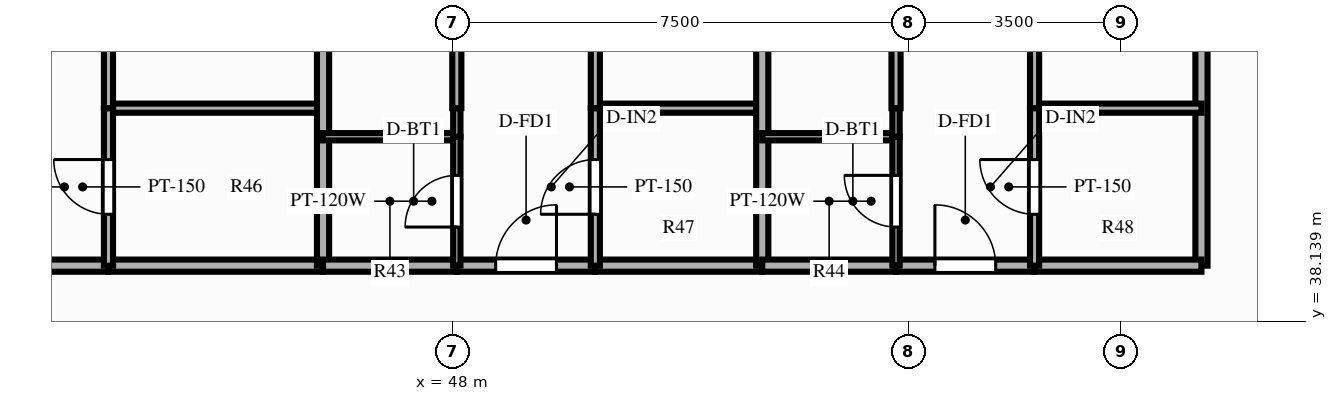
"""IFC4 building model, lengths in metres.
Left out: names, types, materials, properties, quantities, classifications, styles, units other than length and angle.
Written with IfcOpenShell. Run it as: python <this file> out.ifc"""

import sys

from ifc_helpers import new_model, si_unit, direction, frame, frame_2d, origin, place, context, subcontext, project, spatial, rectangle, extrude, source, transform, mapped, element, fill, save


model = new_model("IFC4")
c1 = context("Model", 3, precision=1e-05, world=origin(), true_north=direction((0.0, 1.0)))
c2 = subcontext(c1, "Body", "Model", "MODEL_VIEW")
j1 = project(units=[si_unit("LENGTHUNIT", "METRE"), si_unit("PLANEANGLEUNIT", "RADIAN")], contexts=[c1])
p1 = place(None, origin())
s1 = spatial("IfcSite", under=j1, at=p1, CompositionType="ELEMENT")
p2 = place(p1, origin())
s2 = spatial("IfcBuilding", under=s1, at=p2, CompositionType="ELEMENT")
p3 = place(p2, frame((0.0, 0.0, 25.4)))
s3 = spatial("IfcBuildingStorey", under=s2, at=p3, CompositionType="ELEMENT", Elevation=25.4)
p4 = place(p3, frame((60.32, 39.05, 0.0), z_axis=(0.0, 0.0, 1.0), x_axis=(0.0, 1.0, 0.0)))
e1 = element("IfcWall", 1, at=p4, inside=s3, PredefinedType="PARTITIONING", context=c2, shape_type="SweptSolid", body=[
    extrude(rectangle(XDim=11.8, YDim=0.2, at=frame_2d((5.9, 0.0))), origin(), (0.0, 0.0, 1.0), 2.79),
])
p5 = place(p3, frame((34.602, 39.05, 0.0), z_axis=(0.0, 0.0, 1.0), x_axis=(1.0, 0.0, 0.0)))
e2 = element("IfcWall", 2, at=p5, inside=s3, PredefinedType="PARTITIONING", context=c2, shape_type="SweptSolid", body=[
    extrude(rectangle(XDim=7.743, YDim=0.2, at=frame_2d((3.871, 0.0))), origin(), (0.0, 0.0, 1.0), 2.79),
])
p6 = place(p5, frame((3.371, 0.0, 0.0)))
e3 = element("IfcOpeningElement", 3, at=p6, cuts=e2, PredefinedType="OPENING", context=c2, shape_type="SweptSolid", body=[
    extrude(rectangle(XDim=1.0, YDim=2.15, at=frame_2d((0.5, 1.075))), frame((0.0, 0.112, 0.0), z_axis=(0.0, -1.0, 0.0), x_axis=(1.0, 0.0, 0.0)), (0.0, 0.0, 1.0), 0.224),
])
p7 = place(p3, frame((42.344, 39.05, 0.0), z_axis=(0.0, 0.0, 1.0), x_axis=(1.0, 0.0, 0.0)))
e4 = element("IfcWall", 4, at=p7, inside=s3, PredefinedType="PARTITIONING", context=c2, shape_type="SweptSolid", body=[
    extrude(rectangle(XDim=3.529, YDim=0.2, at=frame_2d((1.764, 0.0))), origin(), (0.0, 0.0, 1.0), 2.79),
])
p8 = place(p3, frame((42.344, 41.64, 0.0), z_axis=(0.0, 0.0, 1.0), x_axis=(1.0, 0.0, 0.0)))
e5 = element("IfcWall", 5, at=p8, inside=s3, PredefinedType="PARTITIONING", context=c2, shape_type="SweptSolid", body=[
    extrude(rectangle(XDim=3.529, YDim=0.15, at=frame_2d((1.764, 0.0))), origin(), (0.0, 0.0, 1.0), 2.79),
])
p9 = place(p3, frame((42.344, 39.05, 0.0), z_axis=(0.0, 0.0, 1.0), x_axis=(0.0, 1.0, 0.0)))
e6 = element("IfcWall", 6, at=p9, inside=s3, PredefinedType="PARTITIONING", context=c2, shape_type="SweptSolid", body=[
    extrude(rectangle(XDim=2.59, YDim=0.15, at=frame_2d((1.295, 0.0))), origin(), (0.0, 0.0, 1.0), 2.79),
])
p10 = place(p9, frame((0.845, 0.0, 0.0)))
e7 = element("IfcOpeningElement", 7, at=p10, cuts=e6, PredefinedType="OPENING", context=c2, shape_type="SweptSolid", body=[
    extrude(rectangle(XDim=0.9, YDim=2.1, at=frame_2d((0.45, 1.05))), frame((0.0, 0.087, 0.0), z_axis=(0.0, -1.0, 0.0), x_axis=(1.0, 0.0, 0.0)), (0.0, 0.0, 1.0), 0.174),
])
p11 = place(p3, frame((42.344, 41.64, 0.0), z_axis=(0.0, 0.0, 1.0), x_axis=(0.0, 1.0, 0.0)))
e8 = element("IfcWall", 8, at=p11, inside=s3, PredefinedType="PARTITIONING", context=c2, shape_type="SweptSolid", body=[
    extrude(rectangle(XDim=9.21, YDim=0.15, at=frame_2d((4.605, 0.0))), origin(), (0.0, 0.0, 1.0), 2.79),
])
p12 = place(p11, frame((3.829, 0.0, 0.0)))
e9 = element("IfcOpeningElement", 9, at=p12, cuts=e8, PredefinedType="OPENING", context=c2, shape_type="SweptSolid", body=[
    extrude(rectangle(XDim=0.9, YDim=2.1, at=frame_2d((0.45, 1.05))), frame((0.0, 0.087, 0.0), z_axis=(0.0, -1.0, 0.0), x_axis=(1.0, 0.0, 0.0)), (0.0, 0.0, 1.0), 0.174),
])
p13 = place(p3, frame((45.873, 39.05, 0.0), z_axis=(0.0, 0.0, 1.0), x_axis=(0.0, 1.0, 0.0)))
e10 = element("IfcWall", 10, at=p13, inside=s3, PredefinedType="PARTITIONING", context=c2, shape_type="SweptSolid", body=[
    extrude(rectangle(XDim=11.8, YDim=0.2, at=frame_2d((5.9, 0.0))), origin(), (0.0, 0.0, 1.0), 2.79),
])
p14 = place(p3, frame((45.873, 39.05, 0.0), z_axis=(0.0, 0.0, 1.0), x_axis=(1.0, 0.0, 0.0)))
e11 = element("IfcWall", 11, at=p14, inside=s3, PredefinedType="PARTITIONING", context=c2, shape_type="SweptSolid", body=[
    extrude(rectangle(XDim=2.2, YDim=0.2, at=frame_2d((1.1, 0.0))), origin(), (0.0, 0.0, 1.0), 2.79),
])
p15 = place(p3, frame((48.073, 39.05, 0.0), z_axis=(0.0, 0.0, 1.0), x_axis=(1.0, 0.0, 0.0)))
e12 = element("IfcWall", 12, at=p15, inside=s3, PredefinedType="PARTITIONING", context=c2, shape_type="SweptSolid", body=[
    extrude(rectangle(XDim=2.278, YDim=0.2, at=frame_2d((1.139, 0.0))), origin(), (0.0, 0.0, 1.0), 2.79),
])
p16 = place(p15, frame((0.639, 0.0, 0.0)))
e13 = element("IfcOpeningElement", 13, at=p16, cuts=e12, PredefinedType="OPENING", context=c2, shape_type="SweptSolid", body=[
    extrude(rectangle(XDim=1.0, YDim=2.15, at=frame_2d((0.5, 1.075))), frame((0.0, 0.112, 0.0), z_axis=(0.0, -1.0, 0.0), x_axis=(1.0, 0.0, 0.0)), (0.0, 0.0, 1.0), 0.224),
])
p17 = place(p3, frame((50.352, 39.05, 0.0), z_axis=(0.0, 0.0, 1.0), x_axis=(1.0, 0.0, 0.0)))
e14 = element("IfcWall", 14, at=p17, inside=s3, PredefinedType="PARTITIONING", context=c2, shape_type="SweptSolid", body=[
    extrude(rectangle(XDim=2.745, YDim=0.2, at=frame_2d((1.373, 0.0))), origin(), (0.0, 0.0, 1.0), 2.79),
])
p18 = place(p3, frame((45.873, 41.17, 0.0), z_axis=(0.0, 0.0, 1.0), x_axis=(1.0, 0.0, 0.0)))
e15 = element("IfcWall", 15, at=p18, inside=s3, PredefinedType="PARTITIONING", context=c2, shape_type="SweptSolid", body=[
    extrude(rectangle(XDim=2.2, YDim=0.12, at=frame_2d((1.1, 0.0))), origin(), (0.0, 0.0, 1.0), 2.79),
])
p19 = place(p3, frame((50.352, 41.64, 0.0), z_axis=(0.0, 0.0, 1.0), x_axis=(1.0, 0.0, 0.0)))
e16 = element("IfcWall", 16, at=p19, inside=s3, PredefinedType="PARTITIONING", context=c2, shape_type="SweptSolid", body=[
    extrude(rectangle(XDim=2.745, YDim=0.15, at=frame_2d((1.373, 0.0))), origin(), (0.0, 0.0, 1.0), 2.79),
])
p20 = place(p3, frame((48.073, 39.05, 0.0), z_axis=(0.0, 0.0, 1.0), x_axis=(0.0, 1.0, 0.0)))
e17 = element("IfcWall", 17, at=p20, inside=s3, PredefinedType="PARTITIONING", context=c2, shape_type="SweptSolid", body=[
    extrude(rectangle(XDim=2.12, YDim=0.12, at=frame_2d((1.06, 0.0))), origin(), (0.0, 0.0, 1.0), 2.79),
])
p21 = place(p20, frame((0.635, 0.0, 0.0)))
e18 = element("IfcOpeningElement", 18, at=p21, cuts=e17, PredefinedType="OPENING", context=c2, shape_type="SweptSolid", body=[
    extrude(rectangle(XDim=0.85, YDim=2.05, at=frame_2d((0.425, 1.025))), frame((0.0, 0.072, 0.0), z_axis=(0.0, -1.0, 0.0), x_axis=(1.0, 0.0, 0.0)), (0.0, 0.0, 1.0), 0.144),
])
p22 = place(p3, frame((48.073, 41.17, 0.0), z_axis=(0.0, 0.0, 1.0), x_axis=(0.0, 1.0, 0.0)))
e19 = element("IfcWall", 19, at=p22, inside=s3, PredefinedType="PARTITIONING", context=c2, shape_type="SweptSolid", body=[
    extrude(rectangle(XDim=0.47, YDim=0.12, at=frame_2d((0.235, 0.0))), origin(), (0.0, 0.0, 1.0), 2.79),
])
p23 = place(p3, frame((48.073, 41.64, 0.0), z_axis=(0.0, 0.0, 1.0), x_axis=(0.0, 1.0, 0.0)))
e20 = element("IfcWall", 20, at=p23, inside=s3, PredefinedType="PARTITIONING", context=c2, shape_type="SweptSolid", body=[
    extrude(rectangle(XDim=9.21, YDim=0.15, at=frame_2d((4.605, 0.0))), origin(), (0.0, 0.0, 1.0), 2.79),
])
p24 = place(p23, frame((3.829, 0.0, 0.0)))
e21 = element("IfcOpeningElement", 21, at=p24, cuts=e20, PredefinedType="OPENING", context=c2, shape_type="SweptSolid", body=[
    extrude(rectangle(XDim=0.9, YDim=2.1, at=frame_2d((0.45, 1.05))), frame((0.0, 0.087, 0.0), z_axis=(0.0, -1.0, 0.0), x_axis=(1.0, 0.0, 0.0)), (0.0, 0.0, 1.0), 0.174),
])
p25 = place(p3, frame((50.352, 39.05, 0.0), z_axis=(0.0, 0.0, 1.0), x_axis=(0.0, 1.0, 0.0)))
e22 = element("IfcWall", 22, at=p25, inside=s3, PredefinedType="PARTITIONING", context=c2, shape_type="SweptSolid", body=[
    extrude(rectangle(XDim=2.59, YDim=0.15, at=frame_2d((1.295, 0.0))), origin(), (0.0, 0.0, 1.0), 2.79),
])
p26 = place(p25, frame((0.845, 0.0, 0.0)))
e23 = element("IfcOpeningElement", 23, at=p26, cuts=e22, PredefinedType="OPENING", context=c2, shape_type="SweptSolid", body=[
    extrude(rectangle(XDim=0.9, YDim=2.1, at=frame_2d((0.45, 1.05))), frame((0.0, 0.087, 0.0), z_axis=(0.0, -1.0, 0.0), x_axis=(1.0, 0.0, 0.0)), (0.0, 0.0, 1.0), 0.174),
])
p27 = place(p3, frame((50.352, 41.64, 0.0), z_axis=(0.0, 0.0, 1.0), x_axis=(0.0, 1.0, 0.0)))
e24 = element("IfcWall", 24, at=p27, inside=s3, PredefinedType="PARTITIONING", context=c2, shape_type="SweptSolid", body=[
    extrude(rectangle(XDim=9.21, YDim=0.15, at=frame_2d((4.605, 0.0))), origin(), (0.0, 0.0, 1.0), 2.79),
])
p28 = place(p27, frame((3.829, 0.0, 0.0)))
e25 = element("IfcOpeningElement", 25, at=p28, cuts=e24, PredefinedType="OPENING", context=c2, shape_type="SweptSolid", body=[
    extrude(rectangle(XDim=0.9, YDim=2.1, at=frame_2d((0.45, 1.05))), frame((0.0, 0.087, 0.0), z_axis=(0.0, -1.0, 0.0), x_axis=(1.0, 0.0, 0.0)), (0.0, 0.0, 1.0), 0.174),
])
p29 = place(p3, frame((53.097, 39.05, 0.0), z_axis=(0.0, 0.0, 1.0), x_axis=(0.0, 1.0, 0.0)))
e26 = element("IfcWall", 26, at=p29, inside=s3, PredefinedType="PARTITIONING", context=c2, shape_type="SweptSolid", body=[
    extrude(rectangle(XDim=11.8, YDim=0.2, at=frame_2d((5.9, 0.0))), origin(), (0.0, 0.0, 1.0), 2.79),
])
p30 = place(p3, frame((53.097, 39.05, 0.0), z_axis=(0.0, 0.0, 1.0), x_axis=(1.0, 0.0, 0.0)))
e27 = element("IfcWall", 27, at=p30, inside=s3, PredefinedType="PARTITIONING", context=c2, shape_type="SweptSolid", body=[
    extrude(rectangle(XDim=2.2, YDim=0.2, at=frame_2d((1.1, 0.0))), origin(), (0.0, 0.0, 1.0), 2.79),
])
p31 = place(p3, frame((55.297, 39.05, 0.0), z_axis=(0.0, 0.0, 1.0), x_axis=(1.0, 0.0, 0.0)))
e28 = element("IfcWall", 28, at=p31, inside=s3, PredefinedType="PARTITIONING", context=c2, shape_type="SweptSolid", body=[
    extrude(rectangle(XDim=2.279, YDim=0.2, at=frame_2d((1.139, 0.0))), origin(), (0.0, 0.0, 1.0), 2.79),
])
p32 = place(p31, frame((0.639, 0.0, 0.0)))
e29 = element("IfcOpeningElement", 29, at=p32, cuts=e28, PredefinedType="OPENING", context=c2, shape_type="SweptSolid", body=[
    extrude(rectangle(XDim=1.0, YDim=2.15, at=frame_2d((0.5, 1.075))), frame((0.0, 0.112, 0.0), z_axis=(0.0, -1.0, 0.0), x_axis=(1.0, 0.0, 0.0)), (0.0, 0.0, 1.0), 0.224),
])
p33 = place(p3, frame((57.575, 39.05, 0.0), z_axis=(0.0, 0.0, 1.0), x_axis=(1.0, 0.0, 0.0)))
e30 = element("IfcWall", 30, at=p33, inside=s3, PredefinedType="PARTITIONING", context=c2, shape_type="SweptSolid", body=[
    extrude(rectangle(XDim=2.745, YDim=0.2, at=frame_2d((1.373, 0.0))), origin(), (0.0, 0.0, 1.0), 2.79),
])
p34 = place(p3, frame((53.097, 41.17, 0.0), z_axis=(0.0, 0.0, 1.0), x_axis=(1.0, 0.0, 0.0)))
e31 = element("IfcWall", 31, at=p34, inside=s3, PredefinedType="PARTITIONING", context=c2, shape_type="SweptSolid", body=[
    extrude(rectangle(XDim=2.2, YDim=0.12, at=frame_2d((1.1, 0.0))), origin(), (0.0, 0.0, 1.0), 2.79),
])
p35 = place(p3, frame((57.575, 41.64, 0.0), z_axis=(0.0, 0.0, 1.0), x_axis=(1.0, 0.0, 0.0)))
e32 = element("IfcWall", 32, at=p35, inside=s3, PredefinedType="PARTITIONING", context=c2, shape_type="SweptSolid", body=[
    extrude(rectangle(XDim=2.745, YDim=0.15, at=frame_2d((1.373, 0.0))), origin(), (0.0, 0.0, 1.0), 2.79),
])
p36 = place(p3, frame((55.297, 39.05, 0.0), z_axis=(0.0, 0.0, 1.0), x_axis=(0.0, 1.0, 0.0)))
e33 = element("IfcWall", 33, at=p36, inside=s3, PredefinedType="PARTITIONING", context=c2, shape_type="SweptSolid", body=[
    extrude(rectangle(XDim=2.12, YDim=0.12, at=frame_2d((1.06, 0.0))), origin(), (0.0, 0.0, 1.0), 2.79),
])
p37 = place(p36, frame((0.635, 0.0, 0.0)))
e34 = element("IfcOpeningElement", 34, at=p37, cuts=e33, PredefinedType="OPENING", context=c2, shape_type="SweptSolid", body=[
    extrude(rectangle(XDim=0.85, YDim=2.05, at=frame_2d((0.425, 1.025))), frame((0.0, 0.072, 0.0), z_axis=(0.0, -1.0, 0.0), x_axis=(1.0, 0.0, 0.0)), (0.0, 0.0, 1.0), 0.144),
])
p38 = place(p3, frame((55.297, 41.17, 0.0), z_axis=(0.0, 0.0, 1.0), x_axis=(0.0, 1.0, 0.0)))
e35 = element("IfcWall", 35, at=p38, inside=s3, PredefinedType="PARTITIONING", context=c2, shape_type="SweptSolid", body=[
    extrude(rectangle(XDim=0.47, YDim=0.12, at=frame_2d((0.235, 0.0))), origin(), (0.0, 0.0, 1.0), 2.79),
])
p39 = place(p3, frame((55.297, 41.64, 0.0), z_axis=(0.0, 0.0, 1.0), x_axis=(0.0, 1.0, 0.0)))
e36 = element("IfcWall", 36, at=p39, inside=s3, PredefinedType="PARTITIONING", context=c2, shape_type="SweptSolid", body=[
    extrude(rectangle(XDim=9.21, YDim=0.15, at=frame_2d((4.605, 0.0))), origin(), (0.0, 0.0, 1.0), 2.79),
])
p40 = place(p39, frame((3.829, 0.0, 0.0)))
e37 = element("IfcOpeningElement", 37, at=p40, cuts=e36, PredefinedType="OPENING", context=c2, shape_type="SweptSolid", body=[
    extrude(rectangle(XDim=0.9, YDim=2.1, at=frame_2d((0.45, 1.05))), frame((0.0, 0.087, 0.0), z_axis=(0.0, -1.0, 0.0), x_axis=(1.0, 0.0, 0.0)), (0.0, 0.0, 1.0), 0.174),
])
p41 = place(p3, frame((57.575, 39.05, 0.0), z_axis=(0.0, 0.0, 1.0), x_axis=(0.0, 1.0, 0.0)))
e38 = element("IfcWall", 38, at=p41, inside=s3, PredefinedType="PARTITIONING", context=c2, shape_type="SweptSolid", body=[
    extrude(rectangle(XDim=2.59, YDim=0.15, at=frame_2d((1.295, 0.0))), origin(), (0.0, 0.0, 1.0), 2.79),
])
p42 = place(p41, frame((0.845, 0.0, 0.0)))
e39 = element("IfcOpeningElement", 39, at=p42, cuts=e38, PredefinedType="OPENING", context=c2, shape_type="SweptSolid", body=[
    extrude(rectangle(XDim=0.9, YDim=2.1, at=frame_2d((0.45, 1.05))), frame((0.0, 0.087, 0.0), z_axis=(0.0, -1.0, 0.0), x_axis=(1.0, 0.0, 0.0)), (0.0, 0.0, 1.0), 0.174),
])
p43 = place(p3, frame((57.575, 41.64, 0.0), z_axis=(0.0, 0.0, 1.0), x_axis=(0.0, 1.0, 0.0)))
e40 = element("IfcWall", 40, at=p43, inside=s3, PredefinedType="PARTITIONING", context=c2, shape_type="SweptSolid", body=[
    extrude(rectangle(XDim=9.21, YDim=0.15, at=frame_2d((4.605, 0.0))), origin(), (0.0, 0.0, 1.0), 2.79),
])
p44 = place(p43, frame((3.829, 0.0, 0.0)))
e41 = element("IfcOpeningElement", 41, at=p44, cuts=e40, PredefinedType="OPENING", context=c2, shape_type="SweptSolid", body=[
    extrude(rectangle(XDim=0.9, YDim=2.1, at=frame_2d((0.45, 1.05))), frame((0.0, 0.087, 0.0), z_axis=(0.0, -1.0, 0.0), x_axis=(1.0, 0.0, 0.0)), (0.0, 0.0, 1.0), 0.174),
])
m1 = source(origin(), c2, "Body", "SweptSolid", [
    extrude(rectangle(XDim=0.9, YDim=2.1, at=frame_2d((0.45, 1.05))), frame((0.0, 0.025, 0.0), z_axis=(0.0, -1.0, 0.0), x_axis=(1.0, 0.0, 0.0)), (0.0, 0.0, 1.0), 0.05),
])
p45 = place(p10, origin())
e42 = element("IfcDoor", 42, at=p45, inside=s3, OperationType="SINGLE_SWING_RIGHT", PredefinedType="DOOR", context=c2, shape_type="MappedRepresentation", body=[
    mapped(m1, transform((0.0, 0.0, 0.0), scale=1.0)),
])
fill(e7, e42)
m2 = source(origin(), c2, "Body", "SweptSolid", [
    extrude(rectangle(XDim=1.0, YDim=2.15, at=frame_2d((0.5, 1.075))), frame((0.0, 0.025, 0.0), z_axis=(0.0, -1.0, 0.0), x_axis=(1.0, 0.0, 0.0)), (0.0, 0.0, 1.0), 0.05),
])
p46 = place(p16, origin())
e43 = element("IfcDoor", 43, at=p46, inside=s3, OperationType="SINGLE_SWING_RIGHT", PredefinedType="DOOR", context=c2, shape_type="MappedRepresentation", body=[
    mapped(m2, transform((0.0, 0.0, 0.0), scale=1.0)),
])
fill(e13, e43)
m3 = source(origin(), c2, "Body", "SweptSolid", [
    extrude(rectangle(XDim=0.85, YDim=2.05, at=frame_2d((0.425, 1.025))), frame((0.0, 0.025, 0.0), z_axis=(0.0, -1.0, 0.0), x_axis=(1.0, 0.0, 0.0)), (0.0, 0.0, 1.0), 0.05),
])
p47 = place(p21, origin())
e44 = element("IfcDoor", 44, at=p47, inside=s3, OperationType="SINGLE_SWING_LEFT", PredefinedType="DOOR", context=c2, shape_type="MappedRepresentation", body=[
    mapped(m3, transform((0.0, 0.0, 0.0), scale=1.0)),
])
fill(e18, e44)
p48 = place(p26, origin())
e45 = element("IfcDoor", 45, at=p48, inside=s3, OperationType="SINGLE_SWING_LEFT", PredefinedType="DOOR", context=c2, shape_type="MappedRepresentation", body=[
    mapped(m1, transform((0.0, 0.0, 0.0), scale=1.0)),
])
fill(e23, e45)
p49 = place(p32, origin())
e46 = element("IfcDoor", 46, at=p49, inside=s3, OperationType="SINGLE_SWING_LEFT", PredefinedType="DOOR", context=c2, shape_type="MappedRepresentation", body=[
    mapped(m2, transform((0.0, 0.0, 0.0), scale=1.0)),
])
fill(e29, e46)
p50 = place(p37, origin())
e47 = element("IfcDoor", 47, at=p50, inside=s3, OperationType="SINGLE_SWING_RIGHT", PredefinedType="DOOR", context=c2, shape_type="MappedRepresentation", body=[
    mapped(m3, transform((0.0, 0.0, 0.0), scale=1.0)),
])
fill(e34, e47)
p51 = place(p42, origin())
e48 = element("IfcDoor", 48, at=p51, inside=s3, OperationType="SINGLE_SWING_RIGHT", PredefinedType="DOOR", context=c2, shape_type="MappedRepresentation", body=[
    mapped(m1, transform((0.0, 0.0, 0.0), scale=1.0)),
])
fill(e39, e48)
save(model, sys.argv[1])
